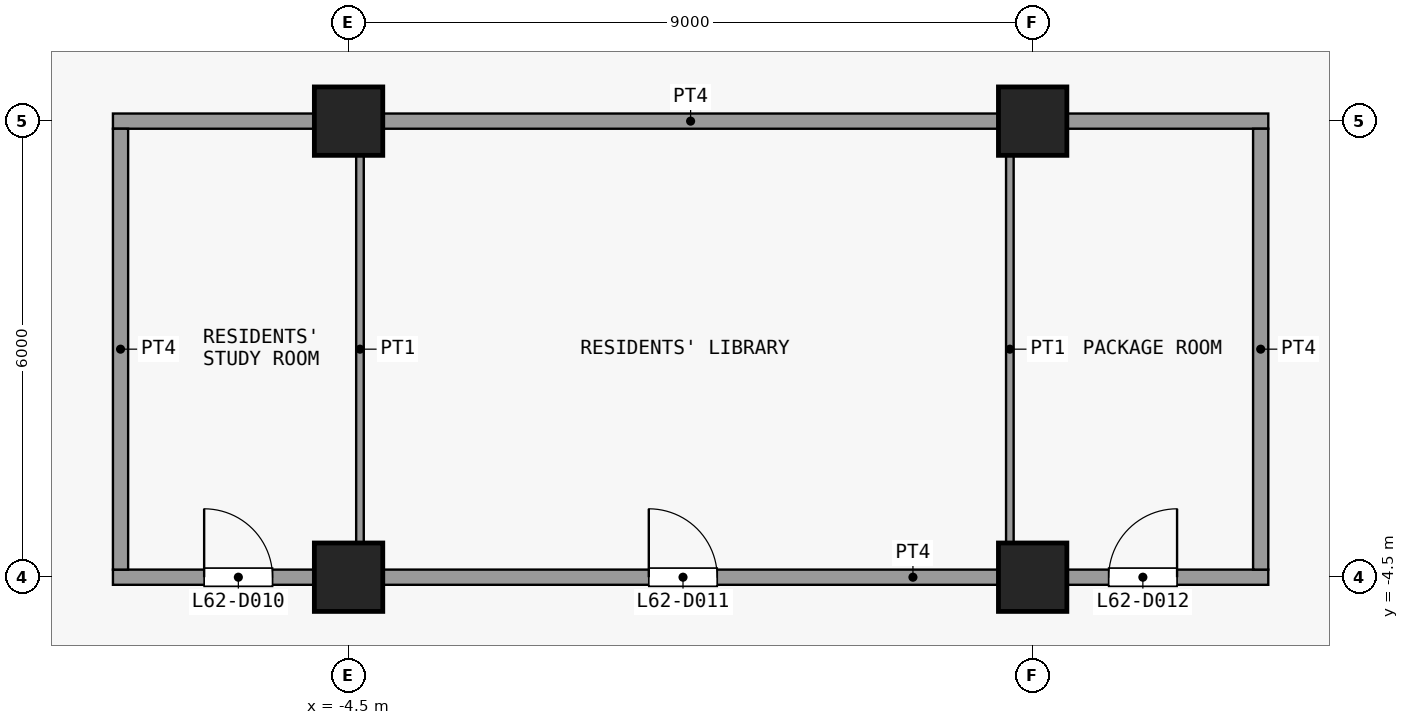
"""IFC4 building model, lengths in metres.
Left out: names, types, materials, properties, quantities, classifications, styles, units other than length and angle.
Written with IfcOpenShell. Run it as: python <this file> out.ifc"""

import sys

from ifc_helpers import new_model, si_unit, direction, frame, frame_2d, origin, origin_2d, place, context, subcontext, project, spatial, rectangle, extrude, element, fill, save


model = new_model("IFC4")
c1 = context("Model", 3, precision=1e-05, world=origin(), true_north=direction((0.0, 1.0)))
c2 = subcontext(c1, "Body", "Model", "MODEL_VIEW")
j1 = project(units=[si_unit("LENGTHUNIT", "METRE"), si_unit("PLANEANGLEUNIT", "RADIAN")], contexts=[c1])
p1 = place(None, origin())
s1 = spatial("IfcSite", under=j1, at=p1, CompositionType="ELEMENT")
p2 = place(p1, origin())
s2 = spatial("IfcBuilding", under=s1, at=p2, CompositionType="ELEMENT")
p3 = place(p2, frame((0.0, 0.0, 244.7)))
s3 = spatial("IfcBuildingStorey", under=s2, at=p3, CompositionType="ELEMENT", Elevation=244.7)
for number, where, z_axis, x_axis in (
    (1, (-4.5, -4.5, 0.0), (0.0, 0.0, 1.0), (1.0, 0.0, 0.0)),
    (2, (-4.5, 1.5, 0.0), (0.0, 0.0, 1.0), (1.0, 0.0, 0.0)),
    (3, (4.5, -4.5, 0.0), (0.0, 0.0, 1.0), (1.0, 0.0, 0.0)),
    (4, (4.5, 1.5, 0.0), (0.0, 0.0, 1.0), (1.0, 0.0, 0.0)),
):
    element("IfcColumn", number, at=place(p3, frame(where, z_axis=z_axis, x_axis=x_axis)), inside=s3, PredefinedType="COLUMN", context=c2, shape_type="SweptSolid", body=[
        extrude(rectangle(XDim=0.9, YDim=0.9, at=origin_2d()), origin(), (0.0, 0.0, 1.0), 3.6),
    ])
p4 = place(p3, frame((-7.6, -4.5, 0.0), z_axis=(0.0, 0.0, 1.0), x_axis=(1.0, 0.0, 0.0)))
e5 = element("IfcWall", 5, at=p4, inside=s3, PredefinedType="PARTITIONING", context=c2, shape_type="SweptSolid", body=[
    extrude(rectangle(XDim=15.2, YDim=0.2, at=frame_2d((7.6, 0.0))), origin(), (0.0, 0.0, 1.0), 3.15),
])
p5 = place(p4, frame((1.2, 0.0, 0.0)))
e6 = element("IfcOpeningElement", 6, at=p5, cuts=e5, PredefinedType="OPENING", context=c2, shape_type="SweptSolid", body=[
    extrude(rectangle(XDim=0.9, YDim=2.1, at=frame_2d((0.45, 1.05))), frame((0.0, 0.11, 0.0), z_axis=(0.0, -1.0, 0.0), x_axis=(1.0, 0.0, 0.0)), (0.0, 0.0, 1.0), 0.22),
])
p6 = place(p4, frame((7.05, 0.0, 0.0)))
e7 = element("IfcOpeningElement", 7, at=p6, cuts=e5, PredefinedType="OPENING", context=c2, shape_type="SweptSolid", body=[
    extrude(rectangle(XDim=0.9, YDim=2.1, at=frame_2d((0.45, 1.05))), frame((0.0, 0.11, 0.0), z_axis=(0.0, -1.0, 0.0), x_axis=(1.0, 0.0, 0.0)), (0.0, 0.0, 1.0), 0.22),
])
p7 = place(p4, frame((13.1, 0.0, 0.0)))
e8 = element("IfcOpeningElement", 8, at=p7, cuts=e5, PredefinedType="OPENING", context=c2, shape_type="SweptSolid", body=[
    extrude(rectangle(XDim=0.9, YDim=2.1, at=frame_2d((0.45, 1.05))), frame((0.0, 0.11, 0.0), z_axis=(0.0, -1.0, 0.0), x_axis=(1.0, 0.0, 0.0)), (0.0, 0.0, 1.0), 0.22),
])
p8 = place(p3, frame((-7.6, 1.5, 0.0), z_axis=(0.0, 0.0, 1.0), x_axis=(1.0, 0.0, 0.0)))
e9 = element("IfcWall", 9, at=p8, inside=s3, PredefinedType="PARTITIONING", context=c2, shape_type="SweptSolid", body=[
    extrude(rectangle(XDim=15.2, YDim=0.2, at=frame_2d((7.6, 0.0))), origin(), (0.0, 0.0, 1.0), 3.15),
])
p9 = place(p3, frame((-7.5, -4.4, 0.0), z_axis=(0.0, 0.0, 1.0), x_axis=(0.0, 1.0, 0.0)))
e10 = element("IfcWall", 10, at=p9, inside=s3, PredefinedType="PARTITIONING", context=c2, shape_type="SweptSolid", body=[
    extrude(rectangle(XDim=5.8, YDim=0.2, at=frame_2d((2.9, 0.0))), origin(), (0.0, 0.0, 1.0), 3.15),
])
for number, where, z_axis, x_axis in (
    (11, (-4.35, -4.4, 0.0), (0.0, 0.0, 1.0), (0.0, 1.0, 0.0)),
    (12, (4.2, -4.4, 0.0), (0.0, 0.0, 1.0), (0.0, 1.0, 0.0)),
):
    element("IfcWall", number, at=place(p3, frame(where, z_axis=z_axis, x_axis=x_axis)), inside=s3, PredefinedType="PARTITIONING", context=c2, shape_type="SweptSolid", body=[
        extrude(rectangle(XDim=5.8, YDim=0.1, at=frame_2d((2.9, 0.0))), origin(), (0.0, 0.0, 1.0), 3.15),
    ])
p10 = place(p3, frame((7.5, -4.4, 0.0), z_axis=(0.0, 0.0, 1.0), x_axis=(0.0, 1.0, 0.0)))
e13 = element("IfcWall", 13, at=p10, inside=s3, PredefinedType="PARTITIONING", context=c2, shape_type="SweptSolid", body=[
    extrude(rectangle(XDim=5.8, YDim=0.2, at=frame_2d((2.9, 0.0))), origin(), (0.0, 0.0, 1.0), 3.15),
])
p11 = place(p5, origin())
e14 = element("IfcDoor", 14, at=p11, inside=s3, OperationType="SINGLE_SWING_RIGHT", PredefinedType="DOOR", context=c2, shape_type="SweptSolid", body=[
    extrude(rectangle(XDim=0.9, YDim=2.1, at=frame_2d((0.45, 1.05))), frame((0.0, 0.025, 0.0), z_axis=(0.0, -1.0, 0.0), x_axis=(1.0, 0.0, 0.0)), (0.0, 0.0, 1.0), 0.05),
])
fill(e6, e14)
p12 = place(p6, origin())
e15 = element("IfcDoor", 15, at=p12, inside=s3, OperationType="SINGLE_SWING_RIGHT", PredefinedType="DOOR", context=c2, shape_type="SweptSolid", body=[
    extrude(rectangle(XDim=0.9, YDim=2.1, at=frame_2d((0.45, 1.05))), frame((0.0, 0.025, 0.0), z_axis=(0.0, -1.0, 0.0), x_axis=(1.0, 0.0, 0.0)), (0.0, 0.0, 1.0), 0.05),
])
fill(e7, e15)
p13 = place(p7, origin())
e16 = element("IfcDoor", 16, at=p13, inside=s3, OperationType="SINGLE_SWING_LEFT", PredefinedType="DOOR", context=c2, shape_type="SweptSolid", body=[
    extrude(rectangle(XDim=0.9, YDim=2.1, at=frame_2d((0.45, 1.05))), frame((0.0, 0.025, 0.0), z_axis=(0.0, -1.0, 0.0), x_axis=(1.0, 0.0, 0.0)), (0.0, 0.0, 1.0), 0.05),
])
fill(e8, e16)
save(model, sys.argv[1])
